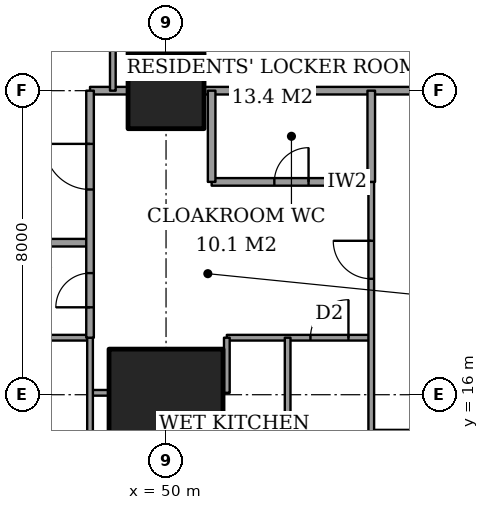
"""IFC4 building model, lengths in metres.
Left out: names, types, materials, properties, quantities, classifications, styles, units other than length and angle.
Written with IfcOpenShell. Run it as: python <this file> out.ifc"""

import sys

from ifc_helpers import new_model, si_unit, direction, frame, frame_2d, origin, origin_2d, place, context, subcontext, project, spatial, rectangle, extrude, element, fill, save


model = new_model("IFC4")
c1 = context("Model", 3, precision=1e-05, world=origin(), true_north=direction((0.0, 1.0)))
c2 = subcontext(c1, "Body", "Model", "MODEL_VIEW")
j1 = project(units=[si_unit("LENGTHUNIT", "METRE"), si_unit("PLANEANGLEUNIT", "RADIAN")], contexts=[c1])
p1 = place(None, origin())
s1 = spatial("IfcSite", under=j1, at=p1, CompositionType="ELEMENT")
p2 = place(p1, origin())
s2 = spatial("IfcBuilding", under=s1, at=p2, CompositionType="ELEMENT")
p3 = place(p2, frame((0.0, 0.0, 153.8)))
s3 = spatial("IfcBuildingStorey", under=s2, at=p3, CompositionType="ELEMENT", Elevation=153.8)
p4 = place(p3, frame((50.0, 16.0, 0.0), z_axis=(0.0, 0.0, 1.0), x_axis=(1.0, 0.0, 0.0)))
e1 = element("IfcColumn", 1, at=p4, inside=s3, PredefinedType="COLUMN", context=c2, shape_type="SweptSolid", body=[
    extrude(rectangle(XDim=3.0, YDim=2.4, at=origin_2d()), origin(), (0.0, 0.0, 1.0), 3.6),
])
p5 = place(p3, frame((50.0, 24.0, 0.0), z_axis=(0.0, 0.0, 1.0), x_axis=(1.0, 0.0, 0.0)))
e2 = element("IfcColumn", 2, at=p5, inside=s3, PredefinedType="COLUMN", context=c2, shape_type="SweptSolid", body=[
    extrude(rectangle(XDim=2.0, YDim=2.0, at=origin_2d()), origin(), (0.0, 0.0, 1.0), 3.6),
])
p6 = place(p3, frame((55.4, 15.0, 0.0), z_axis=(0.0, 0.0, 1.0), x_axis=(1.0, 0.0, 0.0)))
e3 = element("IfcWall", 3, at=p6, inside=s3, PredefinedType="PARTITIONING", context=c2, shape_type="SweptSolid", body=[
    extrude(rectangle(XDim=1.1, YDim=0.15, at=frame_2d((0.55, 0.0))), origin(), (0.0, 0.0, 1.0), 3.35),
])
p7 = place(p3, frame((48.0, 16.05, 0.0), z_axis=(0.0, 0.0, 1.0), x_axis=(1.0, 0.0, 0.0)))
e4 = element("IfcWall", 4, at=p7, inside=s3, PredefinedType="PARTITIONING", context=c2, shape_type="SweptSolid", body=[
    extrude(rectangle(XDim=0.5, YDim=0.15, at=frame_2d((0.25, 0.0))), origin(), (0.0, 0.0, 1.0), 2.634),
])
p8 = place(p3, frame((42.0, 17.5, 0.0), z_axis=(0.0, 0.0, 1.0), x_axis=(1.0, 0.0, 0.0)))
e5 = element("IfcWall", 5, at=p8, inside=s3, PredefinedType="PARTITIONING", context=c2, shape_type="SweptSolid", body=[
    extrude(rectangle(XDim=6.0, YDim=0.15, at=frame_2d((3.0, 0.0))), origin(), (0.0, 0.0, 1.0), 3.35),
])
p9 = place(p3, frame((51.6, 17.5, 0.0), z_axis=(0.0, 0.0, 1.0), x_axis=(1.0, 0.0, 0.0)))
e6 = element("IfcWall", 6, at=p9, inside=s3, PredefinedType="PARTITIONING", context=c2, shape_type="SweptSolid", body=[
    extrude(rectangle(XDim=3.8, YDim=0.15, at=frame_2d((1.9, 0.0))), origin(), (0.0, 0.0, 1.0), 3.35),
])
p10 = place(p9, frame((2.2, 0.0, 0.0)))
e7 = element("IfcOpeningElement", 7, at=p10, cuts=e6, PredefinedType="OPENING", context=c2, shape_type="SweptSolid", body=[
    extrude(rectangle(XDim=1.0, YDim=2.1, at=frame_2d((0.5, 1.05))), frame((0.0, 0.085, 0.0), z_axis=(0.0, -1.0, 0.0), x_axis=(1.0, 0.0, 0.0)), (0.0, 0.0, 1.0), 0.17),
])
p11 = place(p3, frame((42.0, 20.0, 0.0), z_axis=(0.0, 0.0, 1.0), x_axis=(1.0, 0.0, 0.0)))
e8 = element("IfcWall", 8, at=p11, inside=s3, PredefinedType="PARTITIONING", context=c2, shape_type="SweptSolid", body=[
    extrude(rectangle(XDim=6.0, YDim=0.2, at=frame_2d((3.0, 0.0))), origin(), (0.0, 0.0, 1.0), 3.35),
])
p12 = place(p3, frame((51.2, 21.6, 0.0), z_axis=(0.0, 0.0, 1.0), x_axis=(1.0, 0.0, 0.0)))
e9 = element("IfcWall", 9, at=p12, inside=s3, PredefinedType="PARTITIONING", context=c2, shape_type="SweptSolid", body=[
    extrude(rectangle(XDim=4.2, YDim=0.2, at=frame_2d((2.1, 0.0))), origin(), (0.0, 0.0, 1.0), 3.35),
])
p13 = place(p12, frame((1.65, 0.0, 0.0)))
e10 = element("IfcOpeningElement", 10, at=p13, cuts=e9, PredefinedType="OPENING", context=c2, shape_type="SweptSolid", body=[
    extrude(rectangle(XDim=0.9, YDim=2.1, at=frame_2d((0.45, 1.05))), frame((0.0, 0.11, 0.0), z_axis=(0.0, -1.0, 0.0), x_axis=(1.0, 0.0, 0.0)), (0.0, 0.0, 1.0), 0.22),
])
p14 = place(p3, frame((48.0, 24.0, 0.0), z_axis=(0.0, 0.0, 1.0), x_axis=(1.0, 0.0, 0.0)))
e11 = element("IfcWall", 11, at=p14, inside=s3, PredefinedType="PARTITIONING", context=c2, shape_type="SweptSolid", body=[
    extrude(rectangle(XDim=1.0, YDim=0.2, at=frame_2d((0.5, 0.0))), origin(), (0.0, 0.0, 1.0), 3.35),
])
p15 = place(p3, frame((51.0, 24.0, 0.0), z_axis=(0.0, 0.0, 1.0), x_axis=(1.0, 0.0, 0.0)))
e12 = element("IfcWall", 12, at=p15, inside=s3, PredefinedType="PARTITIONING", context=c2, shape_type="SweptSolid", body=[
    extrude(rectangle(XDim=6.0, YDim=0.2, at=frame_2d((3.0, 0.0))), origin(), (0.0, 0.0, 1.0), 3.35),
])
p16 = place(p3, frame((48.0, 17.5, 0.0), z_axis=(0.0, 0.0, 1.0), x_axis=(0.0, 1.0, 0.0)))
e13 = element("IfcWall", 13, at=p16, inside=s3, PredefinedType="PARTITIONING", context=c2, shape_type="SweptSolid", body=[
    extrude(rectangle(XDim=6.5, YDim=0.2, at=frame_2d((3.25, 0.0))), origin(), (0.0, 0.0, 1.0), 3.35),
])
p17 = place(p16, frame((3.9, 0.0, 0.0)))
e14 = element("IfcOpeningElement", 14, at=p17, cuts=e13, PredefinedType="OPENING", context=c2, shape_type="SweptSolid", body=[
    extrude(rectangle(XDim=1.2, YDim=2.4, at=frame_2d((0.6, 1.2))), frame((0.0, 0.11, 0.0), z_axis=(0.0, -1.0, 0.0), x_axis=(1.0, 0.0, 0.0)), (0.0, 0.0, 1.0), 0.22),
])
p18 = place(p16, frame((0.8, 0.0, 0.0)))
e15 = element("IfcOpeningElement", 15, at=p18, cuts=e13, PredefinedType="OPENING", context=c2, shape_type="SweptSolid", body=[
    extrude(rectangle(XDim=0.9, YDim=2.1, at=frame_2d((0.45, 1.05))), frame((0.0, 0.11, 0.0), z_axis=(0.0, -1.0, 0.0), x_axis=(1.0, 0.0, 0.0)), (0.0, 0.0, 1.0), 0.22),
])
p19 = place(p3, frame((48.0, 11.0, 0.0), z_axis=(0.0, 0.0, 1.0), x_axis=(0.0, 1.0, 0.0)))
e16 = element("IfcWall", 16, at=p19, inside=s3, PredefinedType="PARTITIONING", context=c2, shape_type="SweptSolid", body=[
    extrude(rectangle(XDim=6.5, YDim=0.15, at=frame_2d((3.25, 0.0))), origin(), (0.0, 0.0, 1.0), 3.35),
])
p20 = place(p3, frame((48.6, 24.0, 0.0), z_axis=(0.0, 0.0, 1.0), x_axis=(0.0, 1.0, 0.0)))
e17 = element("IfcWall", 17, at=p20, inside=s3, PredefinedType="PARTITIONING", context=c2, shape_type="SweptSolid", body=[
    extrude(rectangle(XDim=1.6, YDim=0.15, at=frame_2d((0.8, 0.0))), origin(), (0.0, 0.0, 1.0), 3.35),
])
p21 = place(p3, frame((51.2, 21.6, 0.0), z_axis=(0.0, 0.0, 1.0), x_axis=(0.0, 1.0, 0.0)))
e18 = element("IfcWall", 18, at=p21, inside=s3, PredefinedType="PARTITIONING", context=c2, shape_type="SweptSolid", body=[
    extrude(rectangle(XDim=2.4, YDim=0.2, at=frame_2d((1.2, 0.0))), origin(), (0.0, 0.0, 1.0), 3.35),
])
p22 = place(p3, frame((51.6, 16.05, 0.0), z_axis=(0.0, 0.0, 1.0), x_axis=(0.0, 1.0, 0.0)))
e19 = element("IfcWall", 19, at=p22, inside=s3, PredefinedType="PARTITIONING", context=c2, shape_type="SweptSolid", body=[
    extrude(rectangle(XDim=1.45, YDim=0.15, at=frame_2d((0.725, 0.0))), origin(), (0.0, 0.0, 1.0), 3.35),
])
p23 = place(p3, frame((53.2, 11.0, 0.0), z_axis=(0.0, 0.0, 1.0), x_axis=(0.0, 1.0, 0.0)))
e20 = element("IfcWall", 20, at=p23, inside=s3, PredefinedType="PARTITIONING", context=c2, shape_type="SweptSolid", body=[
    extrude(rectangle(XDim=6.5, YDim=0.15, at=frame_2d((3.25, 0.0))), origin(), (0.0, 0.0, 1.0), 3.35),
])
p24 = place(p3, frame((55.4, 21.6, 0.0), z_axis=(0.0, 0.0, 1.0), x_axis=(0.0, 1.0, 0.0)))
e21 = element("IfcWall", 21, at=p24, inside=s3, PredefinedType="PARTITIONING", context=c2, shape_type="SweptSolid", body=[
    extrude(rectangle(XDim=2.4, YDim=0.2, at=frame_2d((1.2, 0.0))), origin(), (0.0, 0.0, 1.0), 3.35),
])
p25 = place(p3, frame((55.4, 11.0, 0.0), z_axis=(0.0, 0.0, 1.0), x_axis=(0.0, 1.0, 0.0)))
e22 = element("IfcWall", 22, at=p25, inside=s3, PredefinedType="PARTITIONING", context=c2, shape_type="SweptSolid", body=[
    extrude(rectangle(XDim=10.6, YDim=0.15, at=frame_2d((5.3, 0.0))), origin(), (0.0, 0.0, 1.0), 3.35),
])
p26 = place(p25, frame((8.05, 0.0, 0.0)))
e23 = element("IfcOpeningElement", 23, at=p26, cuts=e22, PredefinedType="OPENING", context=c2, shape_type="SweptSolid", body=[
    extrude(rectangle(XDim=1.0, YDim=2.1, at=frame_2d((0.5, 1.05))), frame((0.0, 0.085, 0.0), z_axis=(0.0, -1.0, 0.0), x_axis=(1.0, 0.0, 0.0)), (0.0, 0.0, 1.0), 0.17),
])
p27 = place(p26, origin())
e24 = element("IfcDoor", 24, at=p27, inside=s3, OperationType="SINGLE_SWING_LEFT", PredefinedType="DOOR", context=c2, shape_type="SweptSolid", body=[
    extrude(rectangle(XDim=1.0, YDim=2.1, at=frame_2d((0.5, 1.05))), frame((0.0, 0.025, 0.0), z_axis=(0.0, -1.0, 0.0), x_axis=(1.0, 0.0, 0.0)), (0.0, 0.0, 1.0), 0.05),
])
fill(e23, e24)
p28 = place(p13, origin())
e25 = element("IfcDoor", 25, at=p28, inside=s3, OperationType="SINGLE_SWING_LEFT", PredefinedType="DOOR", context=c2, shape_type="SweptSolid", body=[
    extrude(rectangle(XDim=0.9, YDim=2.1, at=frame_2d((0.45, 1.05))), frame((0.0, 0.025, 0.0), z_axis=(0.0, -1.0, 0.0), x_axis=(1.0, 0.0, 0.0)), (0.0, 0.0, 1.0), 0.05),
])
fill(e10, e25)
p29 = place(p17, origin())
e26 = element("IfcDoor", 26, at=p29, inside=s3, OperationType="SINGLE_SWING_LEFT", PredefinedType="DOOR", context=c2, shape_type="SweptSolid", body=[
    extrude(rectangle(XDim=1.2, YDim=2.4, at=frame_2d((0.6, 1.2))), frame((0.0, 0.025, 0.0), z_axis=(0.0, -1.0, 0.0), x_axis=(1.0, 0.0, 0.0)), (0.0, 0.0, 1.0), 0.05),
])
fill(e14, e26)
p30 = place(p10, origin())
e27 = element("IfcDoor", 27, at=p30, inside=s3, OperationType="SINGLE_SWING_LEFT", PredefinedType="DOOR", context=c2, shape_type="SweptSolid", body=[
    extrude(rectangle(XDim=1.0, YDim=2.1, at=frame_2d((0.5, 1.05))), frame((0.0, 0.025, 0.0), z_axis=(0.0, -1.0, 0.0), x_axis=(1.0, 0.0, 0.0)), (0.0, 0.0, 1.0), 0.05),
])
fill(e7, e27)
p31 = place(p18, origin())
e28 = element("IfcDoor", 28, at=p31, inside=s3, OperationType="SINGLE_SWING_RIGHT", PredefinedType="DOOR", context=c2, shape_type="SweptSolid", body=[
    extrude(rectangle(XDim=0.9, YDim=2.1, at=frame_2d((0.45, 1.05))), frame((0.0, 0.025, 0.0), z_axis=(0.0, -1.0, 0.0), x_axis=(1.0, 0.0, 0.0)), (0.0, 0.0, 1.0), 0.05),
])
fill(e15, e28)
save(model, sys.argv[1])
